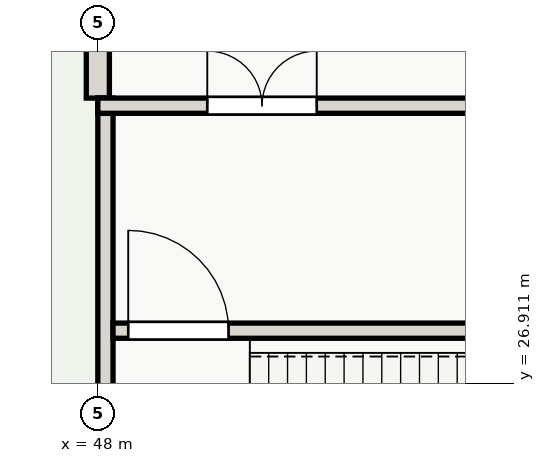
"""IFC4 building model, lengths in metres.
Left out: names, types, materials, properties, quantities, classifications, styles, units other than length and angle.
Written with IfcOpenShell. Run it as: python <this file> out.ifc"""

import sys

from ifc_helpers import new_model, si_unit, direction, frame, frame_2d, origin, place, context, subcontext, project, spatial, rectangle, extrude, element, fill, save


model = new_model("IFC4")
c1 = context("Model", 3, precision=1e-05, world=origin(), true_north=direction((0.0, 1.0)))
c2 = subcontext(c1, "Body", "Model", "MODEL_VIEW")
j1 = project(units=[si_unit("LENGTHUNIT", "METRE"), si_unit("PLANEANGLEUNIT", "RADIAN")], contexts=[c1])
p1 = place(None, origin())
s1 = spatial("IfcSite", under=j1, at=p1, CompositionType="ELEMENT")
p2 = place(p1, origin())
s2 = spatial("IfcBuilding", under=s1, at=p2, CompositionType="ELEMENT")
p3 = place(p2, origin())
s3 = spatial("IfcBuildingStorey", under=s2, at=p3, CompositionType="ELEMENT", Elevation=0.0)
p4 = place(p3, frame((48.0, 31.6, 0.0), z_axis=(0.0, 0.0, 1.0), x_axis=(0.0, 1.0, 0.0)))
e1 = element("IfcWall", 1, at=p4, inside=s3, PredefinedType="SOLIDWALL", context=c2, shape_type="SweptSolid", body=[
    extrude(rectangle(XDim=4.4, YDim=0.38, at=frame_2d((2.2, 0.0))), origin(), (0.0, 0.0, 1.0), 3.34),
])
p5 = place(p3, frame((48.125, 22.4, 0.0), z_axis=(0.0, 0.0, 1.0), x_axis=(0.0, 1.0, 0.0)))
e2 = element("IfcWall", 2, at=p5, inside=s3, PredefinedType="SHEAR", context=c2, shape_type="SweptSolid", body=[
    extrude(rectangle(XDim=9.2, YDim=0.25, at=frame_2d((4.6, 0.0))), origin(), (0.0, 0.0, 1.0), 4.2),
])
p6 = place(p5, frame((1.4, 0.0, 0.0)))
e3 = element("IfcOpeningElement", 3, at=p6, cuts=e2, PredefinedType="OPENING", context=c2, shape_type="SweptSolid", body=[
    extrude(rectangle(XDim=1.9, YDim=2.2, at=frame_2d((0.95, 1.1))), frame((0.0, 0.135, 0.0), z_axis=(0.0, -1.0, 0.0), x_axis=(1.0, 0.0, 0.0)), (0.0, 0.0, 1.0), 0.27),
])
p7 = place(p3, frame((48.0, 31.475, 0.0), z_axis=(0.0, 0.0, 1.0), x_axis=(1.0, 0.0, 0.0)))
e4 = element("IfcWall", 4, at=p7, inside=s3, PredefinedType="SHEAR", context=c2, shape_type="SweptSolid", body=[
    extrude(rectangle(XDim=9.2, YDim=0.25, at=frame_2d((4.6, 0.0))), origin(), (0.0, 0.0, 1.0), 4.2),
])
p8 = place(p7, frame((1.8, 0.0, 0.0)))
e5 = element("IfcOpeningElement", 5, at=p8, cuts=e4, PredefinedType="OPENING", context=c2, shape_type="SweptSolid", body=[
    extrude(rectangle(XDim=1.8, YDim=2.15, at=frame_2d((0.9, 1.075))), frame((0.0, 0.135, 0.0), z_axis=(0.0, -1.0, 0.0), x_axis=(1.0, 0.0, 0.0)), (0.0, 0.0, 1.0), 0.27),
])
p9 = place(p3, frame((48.25, 27.775, 0.0), z_axis=(0.0, 0.0, 1.0), x_axis=(1.0, 0.0, 0.0)))
e6 = element("IfcWall", 6, at=p9, inside=s3, PredefinedType="SHEAR", context=c2, shape_type="SweptSolid", body=[
    extrude(rectangle(XDim=8.7, YDim=0.25, at=frame_2d((4.35, 0.0))), origin(), (0.0, 0.0, 1.0), 4.2),
])
p10 = place(p9, frame((0.25, 0.0, 0.0)))
e7 = element("IfcOpeningElement", 7, at=p10, cuts=e6, PredefinedType="OPENING", context=c2, shape_type="SweptSolid", body=[
    extrude(rectangle(XDim=1.65, YDim=2.1, at=frame_2d((0.825, 1.05))), frame((0.0, 0.135, 0.0), z_axis=(0.0, -1.0, 0.0), x_axis=(1.0, 0.0, 0.0)), (0.0, 0.0, 1.0), 0.27),
])
p11 = place(p8, origin())
e8 = element("IfcDoor", 8, at=p11, inside=s3, OperationType="DOUBLE_DOOR_SINGLE_SWING", PredefinedType="DOOR", context=c2, shape_type="SweptSolid", body=[
    extrude(rectangle(XDim=1.8, YDim=2.15, at=frame_2d((0.9, 1.075))), frame((0.0, 0.025, 0.0), z_axis=(0.0, -1.0, 0.0), x_axis=(1.0, 0.0, 0.0)), (0.0, 0.0, 1.0), 0.05),
])
fill(e5, e8)
p12 = place(p10, origin())
e9 = element("IfcDoor", 9, at=p12, inside=s3, OperationType="SINGLE_SWING_LEFT", PredefinedType="DOOR", context=c2, shape_type="SweptSolid", body=[
    extrude(rectangle(XDim=1.65, YDim=2.1, at=frame_2d((0.825, 1.05))), frame((0.0, 0.025, 0.0), z_axis=(0.0, -1.0, 0.0), x_axis=(1.0, 0.0, 0.0)), (0.0, 0.0, 1.0), 0.05),
])
fill(e7, e9)
save(model, sys.argv[1])
